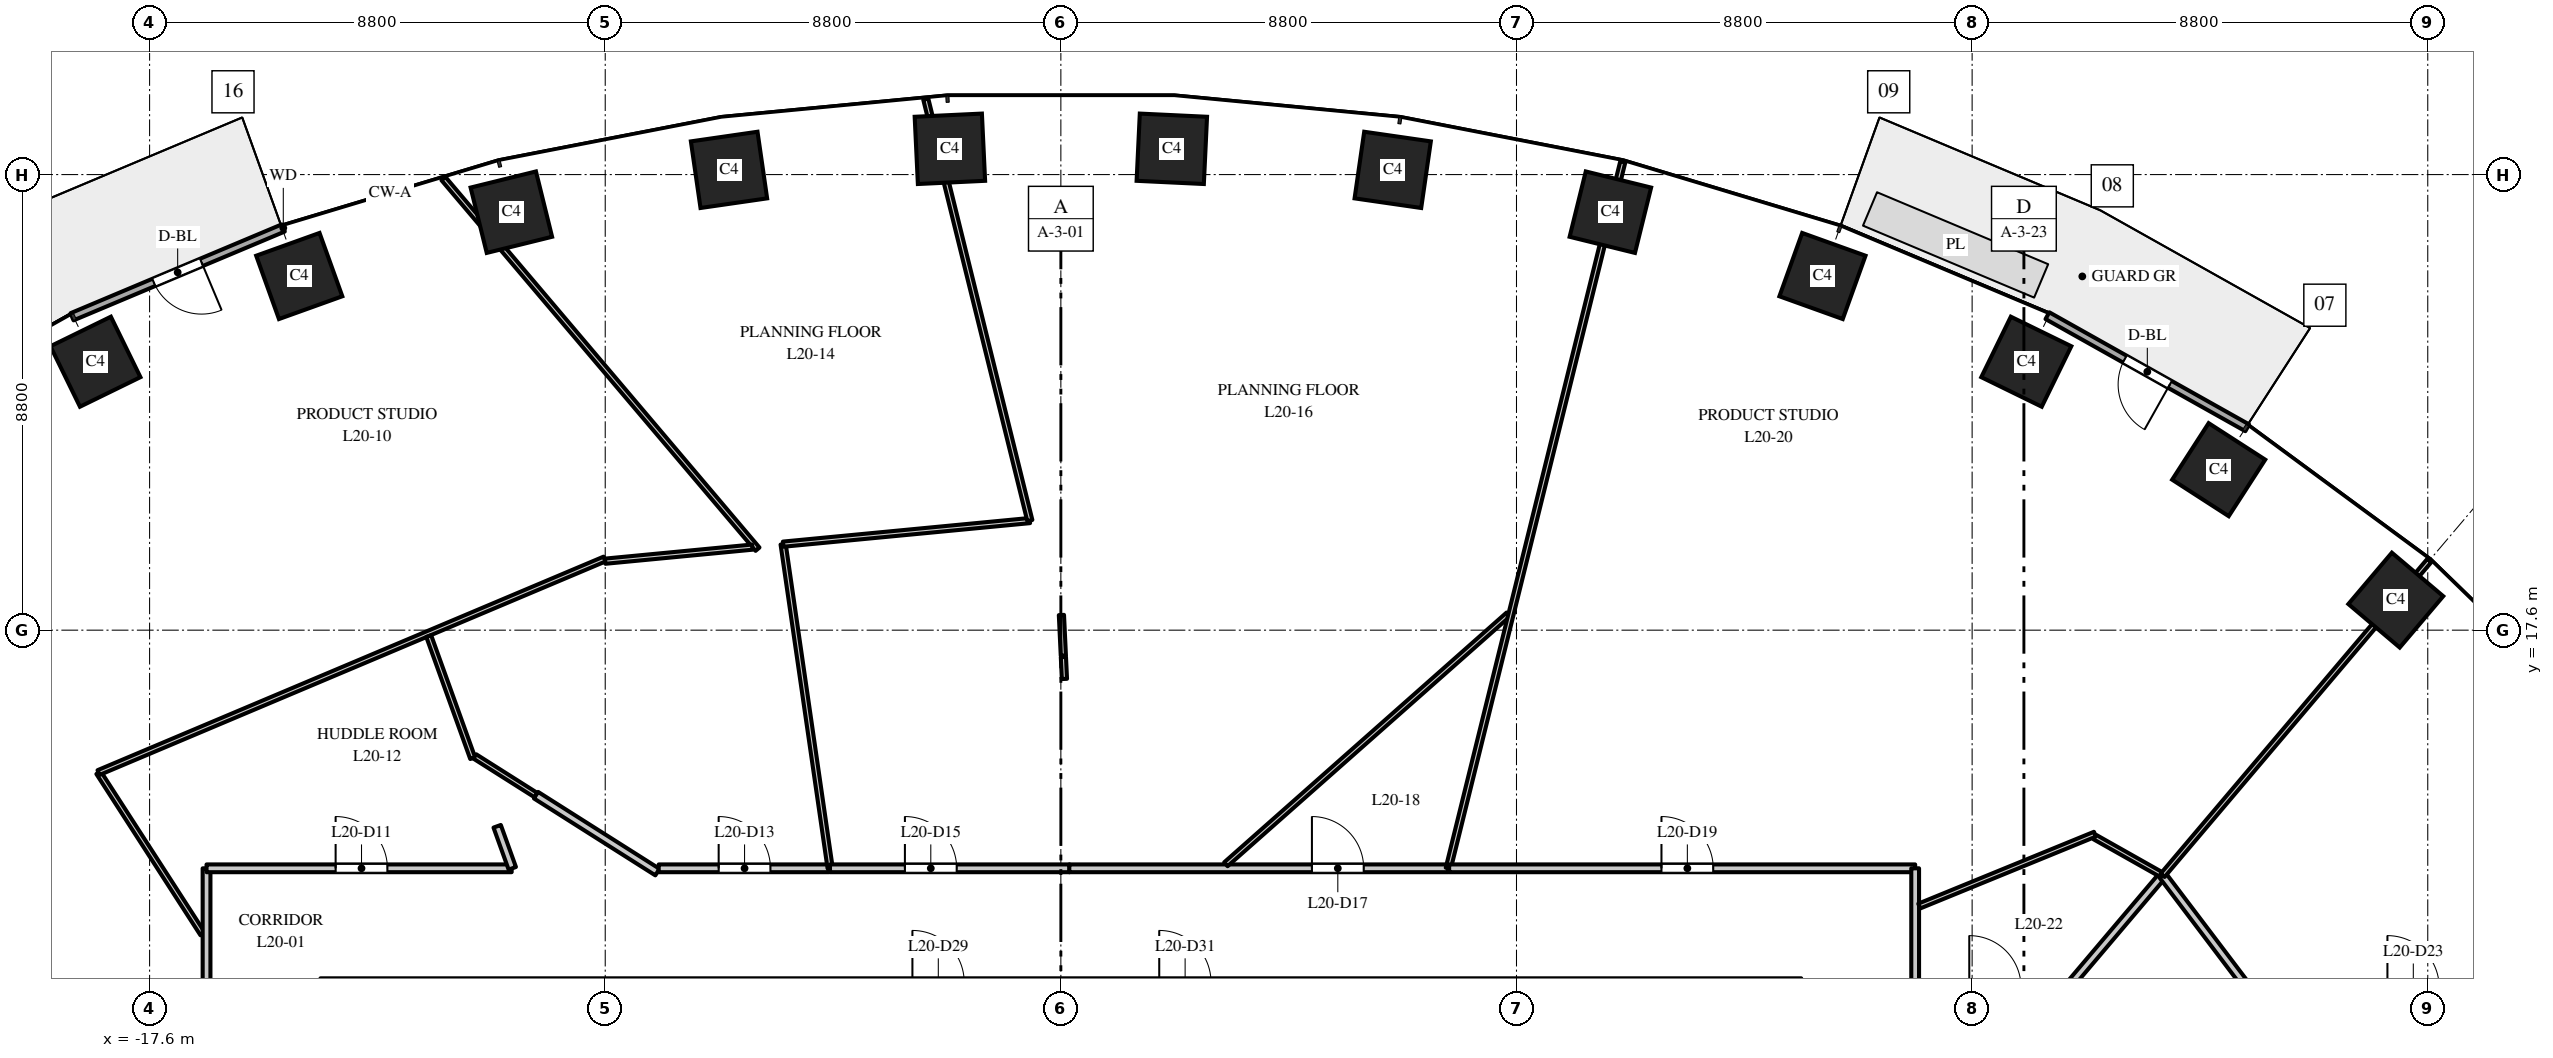
"""IFC4 building model, lengths in metres.
Left out: names, types, materials, properties, quantities, classifications, styles, units other than length and angle.
Written with IfcOpenShell. Run it as: python <this file> out.ifc"""

import sys

from ifc_helpers import new_model, si_unit, direction, frame, frame_2d, origin, origin_2d, place, context, subcontext, project, spatial, rectangle, extrude, element, fill, save


model = new_model("IFC4")
c1 = context("Model", 3, precision=1e-05, world=origin(), true_north=direction((0.0, 1.0)))
c2 = subcontext(c1, "Body", "Model", "MODEL_VIEW")
j1 = project(units=[si_unit("LENGTHUNIT", "METRE"), si_unit("PLANEANGLEUNIT", "RADIAN")], contexts=[c1])
p1 = place(None, origin())
s1 = spatial("IfcSite", under=j1, at=p1, CompositionType="ELEMENT")
p2 = place(p1, origin())
s2 = spatial("IfcBuilding", under=s1, at=p2, CompositionType="ELEMENT")
p3 = place(p2, frame((0.0, 0.0, 92.0)))
s3 = spatial("IfcBuildingStorey", under=s2, at=p3, CompositionType="ELEMENT", Elevation=92.0)
for number, where, z_axis, x_axis in (
    (1, (25.783, 18.18, 0.0), (0.0, 0.0, 1.0), (-0.763, 0.646, 0.0)),
    (2, (22.362, 20.7, 0.0), (0.0, 0.0, 1.0), (-0.84, 0.542, 0.0)),
    (3, (18.646, 22.785, 0.0), (0.0, 0.0, 1.0), (-0.898, 0.439, 0.0)),
    (4, (14.709, 24.441, 0.0), (0.0, 0.0, 1.0), (-0.941, 0.338, 0.0)),
    (5, (10.613, 25.674, 0.0), (0.0, 0.0, 1.0), (-0.971, 0.24, 0.0)),
    (6, (6.409, 26.491, 0.0), (0.0, 0.0, 1.0), (-0.99, 0.143, 0.0)),
    (7, (2.143, 26.898, 0.0), (0.0, 0.0, 1.0), (-0.999, 0.048, 0.0)),
    (8, (-2.143, 26.898, 0.0), (0.0, 0.0, 1.0), (-0.999, -0.048, 0.0)),
    (9, (-6.409, 26.491, 0.0), (0.0, 0.0, 1.0), (-0.99, -0.143, 0.0)),
    (10, (-10.613, 25.674, 0.0), (0.0, 0.0, 1.0), (-0.971, -0.24, 0.0)),
    (11, (-14.709, 24.441, 0.0), (0.0, 0.0, 1.0), (-0.941, -0.338, 0.0)),
    (12, (-18.646, 22.785, 0.0), (0.0, 0.0, 1.0), (-0.898, -0.439, 0.0)),
):
    element("IfcColumn", number, at=place(p3, frame(where, z_axis=z_axis, x_axis=x_axis)), inside=s3, PredefinedType="COLUMN", context=c2, shape_type="SweptSolid", body=[
        extrude(rectangle(XDim=1.3, YDim=1.3, at=origin_2d()), origin(), (0.0, 0.0, 1.0), 4.0),
    ])
p4 = place(p3, frame((22.913, 21.509, 0.0), z_axis=(0.0, 0.0, 1.0), x_axis=(-0.872046572975, 0.489422899509, 0.0)))
e13 = element("IfcWall", 13, at=p4, inside=s3, PredefinedType="STANDARD", context=c2, shape_type="SweptSolid", body=[
    extrude(rectangle(XDim=4.426, YDim=0.15, at=frame_2d((2.213, 0.0))), origin(), (0.0, 0.0, 1.0), 3.7),
])
p5 = place(p4, frame((1.713, 0.0, 0.0)))
e14 = element("IfcOpeningElement", 14, at=p5, cuts=e13, PredefinedType="OPENING", context=c2, shape_type="SweptSolid", body=[
    extrude(rectangle(XDim=1.0, YDim=2.4, at=frame_2d((0.5, 1.2))), frame((0.0, 0.085, 0.0), z_axis=(0.0, -1.0, 0.0), x_axis=(1.0, 0.0, 0.0)), (0.0, 0.0, 1.0), 0.17),
])
p6 = place(p3, frame((-15.018, 25.369, 0.0), z_axis=(0.0, 0.0, 1.0), x_axis=(-0.921816985161, -0.387625393736, 0.0)))
e15 = element("IfcWall", 15, at=p6, inside=s3, PredefinedType="STANDARD", context=c2, shape_type="SweptSolid", body=[
    extrude(rectangle(XDim=4.426, YDim=0.15, at=frame_2d((2.213, 0.0))), origin(), (0.0, 0.0, 1.0), 3.7),
])
p7 = place(p6, frame((1.713, 0.0, 0.0)))
e16 = element("IfcOpeningElement", 16, at=p7, cuts=e15, PredefinedType="OPENING", context=c2, shape_type="SweptSolid", body=[
    extrude(rectangle(XDim=1.0, YDim=2.4, at=frame_2d((0.5, 1.2))), frame((0.0, 0.085, 0.0), z_axis=(0.0, -1.0, 0.0), x_axis=(1.0, 0.0, 0.0)), (0.0, 0.0, 1.0), 0.17),
])
p8 = place(p3, frame((-18.586, 14.849, 0.0), z_axis=(0.0, 0.0, 1.0), x_axis=(0.542227325377, -0.840231829684, 0.0)))
e17 = element("IfcWall", 17, at=p8, inside=s3, PredefinedType="PARTITIONING", context=c2, shape_type="SweptSolid", body=[
    extrude(rectangle(XDim=3.709, YDim=0.1, at=frame_2d((1.854, 0.0))), origin(), (0.0, 0.0, 1.0), 2.75),
])
p9 = place(p3, frame((-18.586, 14.849, 0.0), z_axis=(0.0, 0.0, 1.0), x_axis=(0.921309292198, 0.388830539066, 0.0)))
e18 = element("IfcWall", 18, at=p9, inside=s3, PredefinedType="PARTITIONING", context=c2, shape_type="SweptSolid", body=[
    extrude(rectangle(XDim=10.609, YDim=0.1, at=frame_2d((5.304, 0.0))), origin(), (0.0, 0.0, 1.0), 2.85),
])
p10 = place(p3, frame((-16.5, 10.7, 0.0), z_axis=(0.0, 0.0, 1.0), x_axis=(0.0, 1.0, 0.0)))
e19 = element("IfcWall", 19, at=p10, inside=s3, PredefinedType="PARTITIONING", context=c2, shape_type="SweptSolid", body=[
    extrude(rectangle(XDim=2.3, YDim=0.15, at=frame_2d((1.15, 0.0))), origin(), (0.0, 0.0, 1.0), 2.75),
])
p11 = place(p3, frame((-16.5, 13.0, 0.0), z_axis=(0.0, 0.0, 1.0), x_axis=(1.0, 0.0, 0.0)))
e20 = element("IfcWall", 20, at=p11, inside=s3, PredefinedType="PARTITIONING", context=c2, shape_type="SweptSolid", body=[
    extrude(rectangle(XDim=5.893, YDim=0.15, at=frame_2d((2.947, 0.0))), origin(), (0.0, 0.0, 1.0), 2.85),
])
p12 = place(p11, frame((2.493, 0.0, 0.0)))
e21 = element("IfcOpeningElement", 21, at=p12, cuts=e20, PredefinedType="OPENING", context=c2, shape_type="SweptSolid", body=[
    extrude(rectangle(XDim=1.0, YDim=2.1, at=frame_2d((0.5, 1.05))), frame((0.0, 0.085, 0.0), z_axis=(0.0, -1.0, 0.0), x_axis=(1.0, 0.0, 0.0)), (0.0, 0.0, 1.0), 0.17),
])
p13 = place(p3, frame((-14.3, 10.8, 0.0), z_axis=(0.0, 0.0, 1.0), x_axis=(1.0, 0.0, 0.0)))
e22 = element("IfcWall", 22, at=p13, inside=s3, PredefinedType="PARTITIONING", context=c2, shape_type="SweptSolid", body=[
    extrude(rectangle(XDim=28.6, YDim=0.15, at=frame_2d((14.3, 0.0))), origin(), (0.0, 0.0, 1.0), 2.85),
])
p14 = place(p13, frame((11.433, 0.0, 0.0)))
e23 = element("IfcOpeningElement", 23, at=p14, cuts=e22, PredefinedType="OPENING", context=c2, shape_type="SweptSolid", body=[
    extrude(rectangle(XDim=1.0, YDim=2.1, at=frame_2d((0.5, 1.05))), frame((0.0, 0.085, 0.0), z_axis=(0.0, -1.0, 0.0), x_axis=(1.0, 0.0, 0.0)), (0.0, 0.0, 1.0), 0.17),
])
p15 = place(p13, frame((16.2, 0.0, 0.0)))
e24 = element("IfcOpeningElement", 24, at=p15, cuts=e22, PredefinedType="OPENING", context=c2, shape_type="SweptSolid", body=[
    extrude(rectangle(XDim=1.0, YDim=2.1, at=frame_2d((0.5, 1.05))), frame((0.0, 0.085, 0.0), z_axis=(0.0, -1.0, 0.0), x_axis=(1.0, 0.0, 0.0)), (0.0, 0.0, 1.0), 0.17),
])
p16 = place(p3, frame((-12.209, 17.486, 0.0), z_axis=(0.0, 0.0, 1.0), x_axis=(0.338698771758, -0.940894862357, 0.0)))
e25 = element("IfcWall", 25, at=p16, inside=s3, PredefinedType="PARTITIONING", context=c2, shape_type="SweptSolid", body=[
    extrude(rectangle(XDim=2.506, YDim=0.1, at=frame_2d((1.253, 0.0))), origin(), (0.0, 0.0, 1.0), 3.7),
])
p17 = place(p3, frame((-11.925, 26.323, 0.0), z_axis=(0.0, 0.0, 1.0), x_axis=(0.646476265577, -0.762934098101, 0.0)))
e26 = element("IfcWall", 26, at=p17, inside=s3, PredefinedType="PARTITIONING", context=c2, shape_type="SweptSolid", body=[
    extrude(rectangle(XDim=9.384, YDim=0.1, at=frame_2d((4.692, 0.0))), origin(), (0.0, 0.0, 1.0), 2.85),
])
p18 = place(p3, frame((-11.319, 15.161, 0.0), z_axis=(0.0, 0.0, 1.0), x_axis=(0.845102975348, -0.534603555037, 0.0)))
e27 = element("IfcWall", 27, at=p18, inside=s3, PredefinedType="PARTITIONING", context=c2, shape_type="SweptSolid", body=[
    extrude(rectangle(XDim=1.399, YDim=0.1, at=frame_2d((0.699, 0.0))), origin(), (0.0, 0.0, 1.0), 3.7),
])
p19 = place(p3, frame((-10.887, 13.812, 0.0), z_axis=(0.0, 0.0, 1.0), x_axis=(0.338378813476, -0.941009977944, 0.0)))
e28 = element("IfcWall", 28, at=p19, inside=s3, PredefinedType="PARTITIONING", context=c2, shape_type="SweptSolid", body=[
    extrude(rectangle(XDim=0.863, YDim=0.15, at=frame_2d((0.432, 0.0))), origin(), (0.0, 0.0, 1.0), 2.85),
])
p20 = place(p3, frame((-10.137, 14.413, 0.0), z_axis=(0.0, 0.0, 1.0), x_axis=(0.844666662568, -0.535292657475, 0.0)))
e29 = element("IfcWall", 29, at=p20, inside=s3, PredefinedType="PARTITIONING", context=c2, shape_type="SweptSolid", body=[
    extrude(rectangle(XDim=2.776, YDim=0.15, at=frame_2d((1.388, 0.0))), origin(), (0.0, 0.0, 1.0), 3.7),
])
p21 = place(p3, frame((-8.802, 18.932, 0.0), z_axis=(0.0, 0.0, 1.0), x_axis=(0.995447320833, 0.095313332995, 0.0)))
e30 = element("IfcWall", 30, at=p21, inside=s3, PredefinedType="PARTITIONING", context=c2, shape_type="SweptSolid", body=[
    extrude(rectangle(XDim=2.856, YDim=0.1, at=frame_2d((1.428, 0.0))), origin(), (0.0, 0.0, 1.0), 2.85),
])
p22 = place(p3, frame((-7.767, 13.0, 0.0), z_axis=(0.0, 0.0, 1.0), x_axis=(1.0, 0.0, 0.0)))
e31 = element("IfcWall", 31, at=p22, inside=s3, PredefinedType="PARTITIONING", context=c2, shape_type="SweptSolid", body=[
    extrude(rectangle(XDim=3.288, YDim=0.15, at=frame_2d((1.644, 0.0))), origin(), (0.0, 0.0, 1.0), 2.85),
])
p23 = place(p22, frame((1.158, 0.0, 0.0)))
e32 = element("IfcOpeningElement", 32, at=p23, cuts=e31, PredefinedType="OPENING", context=c2, shape_type="SweptSolid", body=[
    extrude(rectangle(XDim=1.0, YDim=2.1, at=frame_2d((0.5, 1.05))), frame((0.0, 0.085, 0.0), z_axis=(0.0, -1.0, 0.0), x_axis=(1.0, 0.0, 0.0)), (0.0, 0.0, 1.0), 0.17),
])
p24 = place(p3, frame((-5.364, 19.261, 0.0), z_axis=(0.0, 0.0, 1.0), x_axis=(0.143605013025, -0.989635084379, 0.0)))
e33 = element("IfcWall", 33, at=p24, inside=s3, PredefinedType="PARTITIONING", context=c2, shape_type="SweptSolid", body=[
    extrude(rectangle(XDim=6.323, YDim=0.1, at=frame_2d((3.161, 0.0))), origin(), (0.0, 0.0, 1.0), 3.7),
])
p25 = place(p3, frame((-5.364, 19.261, 0.0), z_axis=(0.0, 0.0, 1.0), x_axis=(0.995450891917, 0.095276029415, 0.0)))
e34 = element("IfcWall", 34, at=p25, inside=s3, PredefinedType="PARTITIONING", context=c2, shape_type="SweptSolid", body=[
    extrude(rectangle(XDim=4.787, YDim=0.1, at=frame_2d((2.393, 0.0))), origin(), (0.0, 0.0, 1.0), 2.85),
])
p26 = place(p3, frame((-4.459, 13.0, 0.0), z_axis=(0.0, 0.0, 1.0), x_axis=(1.0, 0.0, 0.0)))
e35 = element("IfcWall", 35, at=p26, inside=s3, PredefinedType="PARTITIONING", context=c2, shape_type="SweptSolid", body=[
    extrude(rectangle(XDim=4.628, YDim=0.15, at=frame_2d((2.314, 0.0))), origin(), (0.0, 0.0, 1.0), 2.85),
])
p27 = place(p26, frame((1.447, 0.0, 0.0)))
e36 = element("IfcOpeningElement", 36, at=p27, cuts=e35, PredefinedType="OPENING", context=c2, shape_type="SweptSolid", body=[
    extrude(rectangle(XDim=1.0, YDim=2.1, at=frame_2d((0.5, 1.05))), frame((0.0, 0.085, 0.0), z_axis=(0.0, -1.0, 0.0), x_axis=(1.0, 0.0, 0.0)), (0.0, 0.0, 1.0), 0.17),
])
p28 = place(p3, frame((-2.609, 27.858, 0.0), z_axis=(0.0, 0.0, 1.0), x_axis=(0.239677840558, -0.970852477334, 0.0)))
e37 = element("IfcWall", 37, at=p28, inside=s3, PredefinedType="PARTITIONING", context=c2, shape_type="SweptSolid", body=[
    extrude(rectangle(XDim=8.385, YDim=0.1, at=frame_2d((4.193, 0.0))), origin(), (0.0, 0.0, 1.0), 2.85),
])
p29 = place(p3, frame((0.011, 17.893, 0.0), z_axis=(0.0, 0.0, 1.0), x_axis=(0.047210979752, -0.998884940016, 0.0)))
e38 = element("IfcWall", 38, at=p29, inside=s3, PredefinedType="PARTITIONING", context=c2, shape_type="SweptSolid", body=[
    extrude(rectangle(XDim=0.786, YDim=0.1, at=frame_2d((0.393, 0.0))), origin(), (0.0, 0.0, 1.0), 3.7),
])
p30 = place(p3, frame((0.049, 17.081, 0.0), z_axis=(0.0, 0.0, 1.0), x_axis=(0.047263912187, -0.998882436829, 0.0)))
e39 = element("IfcWall", 39, at=p30, inside=s3, PredefinedType="PARTITIONING", context=c2, shape_type="SweptSolid", body=[
    extrude(rectangle(XDim=0.424, YDim=0.1, at=frame_2d((0.212, 0.0))), origin(), (0.0, 0.0, 1.0), 3.7),
])
p31 = place(p3, frame((0.163, 13.0, 0.0), z_axis=(0.0, 0.0, 1.0), x_axis=(1.0, 0.0, 0.0)))
e40 = element("IfcWall", 40, at=p31, inside=s3, PredefinedType="PARTITIONING", context=c2, shape_type="SweptSolid", body=[
    extrude(rectangle(XDim=7.32, YDim=0.15, at=frame_2d((3.66, 0.0))), origin(), (0.0, 0.0, 1.0), 2.85),
])
p32 = place(p31, frame((4.686, 0.0, 0.0)))
e41 = element("IfcOpeningElement", 41, at=p32, cuts=e40, PredefinedType="OPENING", context=c2, shape_type="SweptSolid", body=[
    extrude(rectangle(XDim=1.0, YDim=2.1, at=frame_2d((0.5, 1.05))), frame((0.0, 0.085, 0.0), z_axis=(0.0, -1.0, 0.0), x_axis=(1.0, 0.0, 0.0)), (0.0, 0.0, 1.0), 0.17),
])
p33 = place(p3, frame((3.187, 13.078, 0.0), z_axis=(0.0, 0.0, 1.0), x_axis=(0.749027274438, 0.662539162728, 0.0)))
e42 = element("IfcWall", 42, at=p33, inside=s3, PredefinedType="PARTITIONING", context=c2, shape_type="SweptSolid", body=[
    extrude(rectangle(XDim=7.283, YDim=0.1, at=frame_2d((3.642, 0.0))), origin(), (0.0, 0.0, 1.0), 2.85),
])
p34 = place(p3, frame((7.482, 13.0, 0.0), z_axis=(0.0, 0.0, 1.0), x_axis=(0.239829226485, 0.970815091623, 0.0)))
e43 = element("IfcWall", 43, at=p34, inside=s3, PredefinedType="PARTITIONING", context=c2, shape_type="SweptSolid", body=[
    extrude(rectangle(XDim=14.056, YDim=0.1, at=frame_2d((7.028, 0.0))), origin(), (0.0, 0.0, 1.0), 2.9),
])
p35 = place(p3, frame((7.499, 13.0, 0.0), z_axis=(0.0, 0.0, 1.0), x_axis=(1.0, 0.0, 0.0)))
e44 = element("IfcWall", 44, at=p35, inside=s3, PredefinedType="PARTITIONING", context=c2, shape_type="SweptSolid", body=[
    extrude(rectangle(XDim=9.001, YDim=0.15, at=frame_2d((4.5, 0.0))), origin(), (0.0, 0.0, 1.0), 2.85),
])
p36 = place(p35, frame((4.101, 0.0, 0.0)))
e45 = element("IfcOpeningElement", 45, at=p36, cuts=e44, PredefinedType="OPENING", context=c2, shape_type="SweptSolid", body=[
    extrude(rectangle(XDim=1.0, YDim=2.1, at=frame_2d((0.5, 1.05))), frame((0.0, 0.085, 0.0), z_axis=(0.0, -1.0, 0.0), x_axis=(1.0, 0.0, 0.0)), (0.0, 0.0, 1.0), 0.17),
])
p37 = place(p3, frame((16.5, 10.7, 0.0), z_axis=(0.0, 0.0, 1.0), x_axis=(0.0, 1.0, 0.0)))
e46 = element("IfcWall", 46, at=p37, inside=s3, PredefinedType="PARTITIONING", context=c2, shape_type="SweptSolid", body=[
    extrude(rectangle(XDim=2.3, YDim=0.15, at=frame_2d((1.15, 0.0))), origin(), (0.0, 0.0, 1.0), 3.7),
])
p38 = place(p3, frame((16.579, 12.271, 0.0), z_axis=(0.0, 0.0, 1.0), x_axis=(0.925550138862, 0.378625065801, 0.0)))
e47 = element("IfcWall", 47, at=p38, inside=s3, PredefinedType="PARTITIONING", context=c2, shape_type="SweptSolid", body=[
    extrude(rectangle(XDim=3.666, YDim=0.1, at=frame_2d((1.833, 0.0))), origin(), (0.0, 0.0, 1.0), 3.7),
])
p39 = place(p3, frame((19.511, 10.778, 0.0), z_axis=(0.0, 0.0, 1.0), x_axis=(0.64641426768, 0.762986628021, 0.0)))
e48 = element("IfcWall", 48, at=p39, inside=s3, PredefinedType="PARTITIONING", context=c2, shape_type="SweptSolid", body=[
    extrude(rectangle(XDim=2.735, YDim=0.15, at=frame_2d((1.368, 0.0))), origin(), (0.0, 0.0, 1.0), 3.7),
])
p40 = place(p3, frame((19.969, 13.604, 0.0), z_axis=(0.0, 0.0, 1.0), x_axis=(0.870976686736, -0.491324344158, 0.0)))
e49 = element("IfcWall", 49, at=p40, inside=s3, PredefinedType="PARTITIONING", context=c2, shape_type="SweptSolid", body=[
    extrude(rectangle(XDim=1.504, YDim=0.1, at=frame_2d((0.752, 0.0))), origin(), (0.0, 0.0, 1.0), 3.7),
])
p41 = place(p3, frame((21.279, 12.865, 0.0), z_axis=(0.0, 0.0, 1.0), x_axis=(0.603433696796, -0.797413176196, 0.0)))
e50 = element("IfcWall", 50, at=p41, inside=s3, PredefinedType="PARTITIONING", context=c2, shape_type="SweptSolid", body=[
    extrude(rectangle(XDim=2.805, YDim=0.15, at=frame_2d((1.403, 0.0))), origin(), (0.0, 0.0, 1.0), 2.75),
])
p42 = place(p3, frame((21.279, 12.865, 0.0), z_axis=(0.0, 0.0, 1.0), x_axis=(0.646395355102, 0.763002650652, 0.0)))
e51 = element("IfcWall", 51, at=p42, inside=s3, PredefinedType="PARTITIONING", context=c2, shape_type="SweptSolid", body=[
    extrude(rectangle(XDim=7.969, YDim=0.1, at=frame_2d((3.984, 0.0))), origin(), (0.0, 0.0, 1.0), 2.9),
])
p43 = place(p5, origin())
e52 = element("IfcDoor", 52, at=p43, inside=s3, OperationType="SINGLE_SWING_LEFT", PredefinedType="DOOR", context=c2, shape_type="SweptSolid", body=[
    extrude(rectangle(XDim=1.0, YDim=2.4, at=frame_2d((0.5, 1.2))), frame((0.0, 0.025, 0.0), z_axis=(0.0, -1.0, 0.0), x_axis=(1.0, 0.0, 0.0)), (0.0, 0.0, 1.0), 0.05),
])
fill(e14, e52)
p44 = place(p7, origin())
e53 = element("IfcDoor", 53, at=p44, inside=s3, OperationType="SINGLE_SWING_LEFT", PredefinedType="DOOR", context=c2, shape_type="SweptSolid", body=[
    extrude(rectangle(XDim=1.0, YDim=2.4, at=frame_2d((0.5, 1.2))), frame((0.0, 0.025, 0.0), z_axis=(0.0, -1.0, 0.0), x_axis=(1.0, 0.0, 0.0)), (0.0, 0.0, 1.0), 0.05),
])
fill(e16, e53)
p45 = place(p12, origin())
e54 = element("IfcDoor", 54, at=p45, inside=s3, OperationType="SINGLE_SWING_LEFT", PredefinedType="DOOR", context=c2, shape_type="SweptSolid", body=[
    extrude(rectangle(XDim=1.0, YDim=2.1, at=frame_2d((0.5, 1.05))), frame((0.0, 0.025, 0.0), z_axis=(0.0, -1.0, 0.0), x_axis=(1.0, 0.0, 0.0)), (0.0, 0.0, 1.0), 0.05),
])
fill(e21, e54)
p46 = place(p23, origin())
e55 = element("IfcDoor", 55, at=p46, inside=s3, OperationType="SINGLE_SWING_LEFT", PredefinedType="DOOR", context=c2, shape_type="SweptSolid", body=[
    extrude(rectangle(XDim=1.0, YDim=2.1, at=frame_2d((0.5, 1.05))), frame((0.0, 0.025, 0.0), z_axis=(0.0, -1.0, 0.0), x_axis=(1.0, 0.0, 0.0)), (0.0, 0.0, 1.0), 0.05),
])
fill(e32, e55)
p47 = place(p27, origin())
e56 = element("IfcDoor", 56, at=p47, inside=s3, OperationType="SINGLE_SWING_LEFT", PredefinedType="DOOR", context=c2, shape_type="SweptSolid", body=[
    extrude(rectangle(XDim=1.0, YDim=2.1, at=frame_2d((0.5, 1.05))), frame((0.0, 0.025, 0.0), z_axis=(0.0, -1.0, 0.0), x_axis=(1.0, 0.0, 0.0)), (0.0, 0.0, 1.0), 0.05),
])
fill(e36, e56)
p48 = place(p32, origin())
e57 = element("IfcDoor", 57, at=p48, inside=s3, OperationType="SINGLE_SWING_LEFT", PredefinedType="DOOR", context=c2, shape_type="SweptSolid", body=[
    extrude(rectangle(XDim=1.0, YDim=2.1, at=frame_2d((0.5, 1.05))), frame((0.0, 0.025, 0.0), z_axis=(0.0, -1.0, 0.0), x_axis=(1.0, 0.0, 0.0)), (0.0, 0.0, 1.0), 0.05),
])
fill(e41, e57)
p49 = place(p36, origin())
e58 = element("IfcDoor", 58, at=p49, inside=s3, OperationType="SINGLE_SWING_LEFT", PredefinedType="DOOR", context=c2, shape_type="SweptSolid", body=[
    extrude(rectangle(XDim=1.0, YDim=2.1, at=frame_2d((0.5, 1.05))), frame((0.0, 0.025, 0.0), z_axis=(0.0, -1.0, 0.0), x_axis=(1.0, 0.0, 0.0)), (0.0, 0.0, 1.0), 0.05),
])
fill(e45, e58)
save(model, sys.argv[1])
